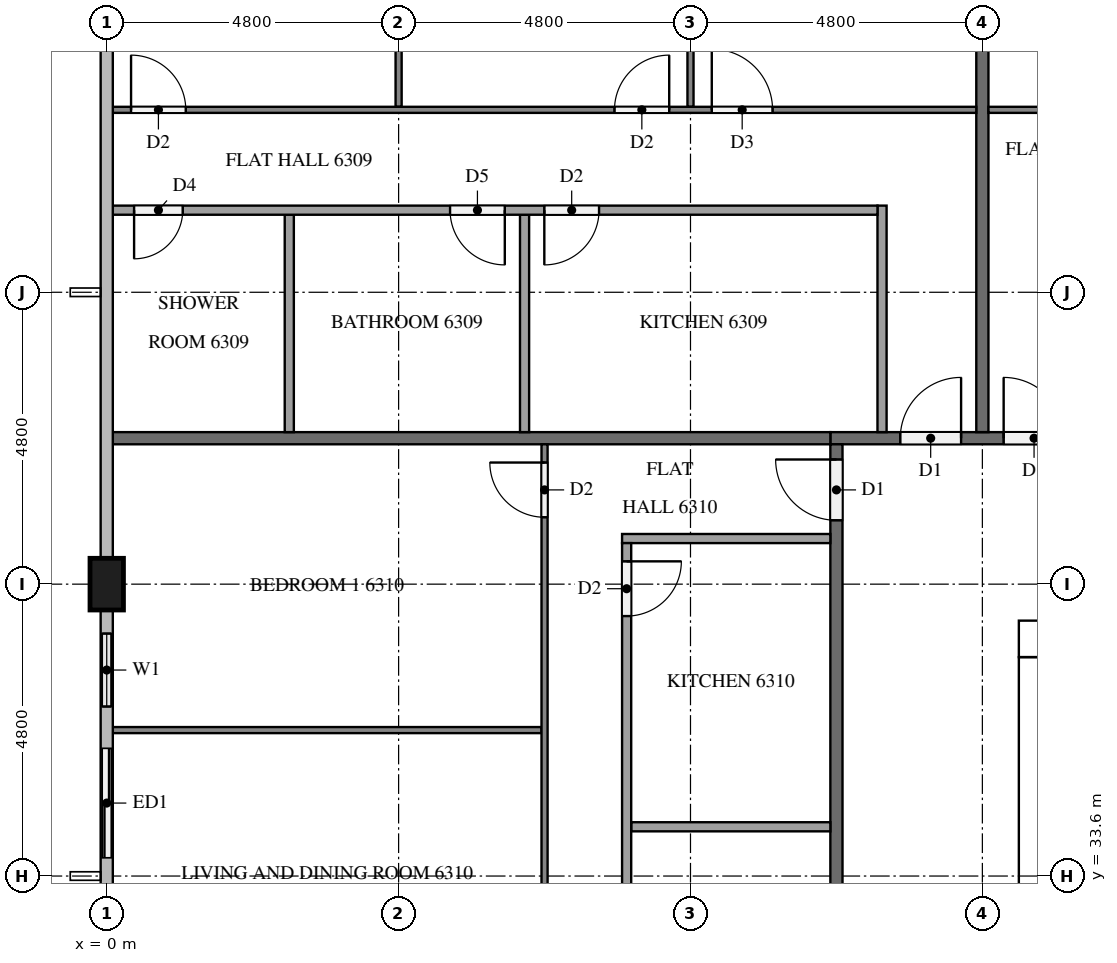
"""IFC4 building model, lengths in metres.
Left out: names, types, materials, properties, quantities, classifications, styles, units other than length and angle.
Written with IfcOpenShell. Run it as: python <this file> out.ifc"""

import sys

from ifc_helpers import new_model, si_unit, direction, frame, frame_2d, origin, origin_2d, place, context, subcontext, project, spatial, rectangle, extrude, element, fill, save


model = new_model("IFC4")
c1 = context("Model", 3, precision=1e-05, world=origin(), true_north=direction((0.0, 1.0)))
c2 = subcontext(c1, "Body", "Model", "MODEL_VIEW")
j1 = project(units=[si_unit("LENGTHUNIT", "METRE"), si_unit("PLANEANGLEUNIT", "RADIAN")], contexts=[c1])
p1 = place(None, origin())
s1 = spatial("IfcSite", under=j1, at=p1, CompositionType="ELEMENT")
p2 = place(p1, origin())
s2 = spatial("IfcBuilding", under=s1, at=p2, CompositionType="ELEMENT")
p3 = place(p2, frame((0.0, 0.0, 242.2)))
s3 = spatial("IfcBuildingStorey", under=s2, at=p3, CompositionType="ELEMENT", Elevation=242.2)
p4 = place(p3, frame((15.0, 37.5, 0.0), z_axis=(0.0, 0.0, 1.0), x_axis=(1.0, 0.0, 0.0)))
e1 = element("IfcWall", 1, at=p4, inside=s3, PredefinedType="SHEAR", context=c2, shape_type="SweptSolid", body=[
    extrude(rectangle(XDim=32.4, YDim=0.6, at=frame_2d((16.2, 0.0))), origin(), (0.0, 0.0, 1.0), 3.2),
])
p5 = place(p4, frame((15.3, 0.0, 0.0)))
e2 = element("IfcOpeningElement", 2, at=p5, cuts=e1, PredefinedType="OPENING", context=c2, shape_type="SweptSolid", body=[
    extrude(rectangle(XDim=1.8, YDim=2.1, at=frame_2d((0.9, 1.05))), frame((0.0, 0.31, 0.0), z_axis=(0.0, -1.0, 0.0), x_axis=(1.0, 0.0, 0.0)), (0.0, 0.0, 1.0), 0.62),
])
p6 = place(p4, frame((1.25, 0.0, 0.0)))
e3 = element("IfcOpeningElement", 3, at=p6, cuts=e1, PredefinedType="OPENING", context=c2, shape_type="SweptSolid", body=[
    extrude(rectangle(XDim=1.0, YDim=2.1, at=frame_2d((0.5, 1.05))), frame((0.0, 0.31, 0.0), z_axis=(0.0, -1.0, 0.0), x_axis=(1.0, 0.0, 0.0)), (0.0, 0.0, 1.0), 0.62),
])
p7 = place(p4, frame((4.988, 0.0, 0.0)))
e4 = element("IfcOpeningElement", 4, at=p7, cuts=e1, PredefinedType="OPENING", context=c2, shape_type="SweptSolid", body=[
    extrude(rectangle(XDim=1.0, YDim=2.1, at=frame_2d((0.5, 1.05))), frame((0.0, 0.31, 0.0), z_axis=(0.0, -1.0, 0.0), x_axis=(1.0, 0.0, 0.0)), (0.0, 0.0, 1.0), 0.62),
])
p8 = place(p3, frame((15.3, 15.6, 0.0), z_axis=(0.0, 0.0, 1.0), x_axis=(0.0, 1.0, 0.0)))
e5 = element("IfcWall", 5, at=p8, inside=s3, PredefinedType="SHEAR", context=c2, shape_type="SweptSolid", body=[
    extrude(rectangle(XDim=21.6, YDim=0.6, at=frame_2d((10.8, 0.0))), origin(), (0.0, 0.0, 1.0), 3.2),
])
p9 = place(p8, frame((5.16, 0.0, 0.0)))
e6 = element("IfcOpeningElement", 6, at=p9, cuts=e5, PredefinedType="OPENING", context=c2, shape_type="SweptSolid", body=[
    extrude(rectangle(XDim=1.2, YDim=2.1, at=frame_2d((0.6, 1.05))), frame((0.0, 0.31, 0.0), z_axis=(0.0, -1.0, 0.0), x_axis=(1.0, 0.0, 0.0)), (0.0, 0.0, 1.0), 0.62),
])
p10 = place(p3, frame((0.0, 38.4, 0.0), z_axis=(0.0, 0.0, 1.0), x_axis=(0.0, 1.0, 0.0)))
e7 = element("IfcColumn", 7, at=p10, inside=s3, PredefinedType="COLUMN", context=c2, shape_type="SweptSolid", body=[
    extrude(rectangle(XDim=0.85, YDim=0.55, at=origin_2d()), origin(), (0.0, 0.0, 1.0), 3.2),
])
p11 = place(p3, frame((0.0, 37.975, 0.0), z_axis=(0.0, 0.0, 1.0), x_axis=(0.0, -1.0, 0.0)))
e8 = element("IfcWall", 8, at=p11, inside=s3, PredefinedType="SOLIDWALL", context=c2, shape_type="SweptSolid", body=[
    extrude(rectangle(XDim=4.375, YDim=0.15, at=frame_2d((2.188, 0.0))), origin(), (0.0, 0.0, 1.0), 3.2),
])
p12 = place(p11, frame((0.387, 0.0, 0.9)))
e9 = element("IfcOpeningElement", 9, at=p12, cuts=e8, PredefinedType="OPENING", context=c2, shape_type="SweptSolid", body=[
    extrude(rectangle(XDim=1.2, YDim=1.4, at=frame_2d((0.6, 0.7))), frame((0.0, 0.085, 0.0), z_axis=(0.0, -1.0, 0.0), x_axis=(1.0, 0.0, 0.0)), (0.0, 0.0, 1.0), 0.17),
])
p13 = place(p11, frame((2.275, 0.0, 0.0)))
e10 = element("IfcOpeningElement", 10, at=p13, cuts=e8, PredefinedType="OPENING", context=c2, shape_type="SweptSolid", body=[
    extrude(rectangle(XDim=1.8, YDim=2.4, at=frame_2d((0.9, 1.2))), frame((0.0, 0.085, 0.0), z_axis=(0.0, -1.0, 0.0), x_axis=(1.0, 0.0, 0.0)), (0.0, 0.0, 1.0), 0.17),
])
p14 = place(p3, frame((11.9, 40.8, 0.0), z_axis=(0.0, 0.0, 1.0), x_axis=(1.0, 0.0, 0.0)))
e11 = element("IfcWall", 11, at=p14, inside=s3, PredefinedType="PARTITIONING", context=c2, shape_type="SweptSolid", body=[
    extrude(rectangle(XDim=38.6, YDim=0.2, at=frame_2d((19.3, 0.0))), origin(), (0.0, 0.0, 1.0), 3.2),
])
p15 = place(p14, frame((34.05, 0.0, 0.0)))
e12 = element("IfcOpeningElement", 12, at=p15, cuts=e11, PredefinedType="OPENING", context=c2, shape_type="SweptSolid", body=[
    extrude(rectangle(XDim=1.0, YDim=2.1, at=frame_2d((0.5, 1.05))), frame((0.0, 0.11, 0.0), z_axis=(0.0, -1.0, 0.0), x_axis=(1.0, 0.0, 0.0)), (0.0, 0.0, 1.0), 0.22),
])
p16 = place(p14, frame((32.3, 0.0, 0.0)))
e13 = element("IfcOpeningElement", 13, at=p16, cuts=e11, PredefinedType="OPENING", context=c2, shape_type="SweptSolid", body=[
    extrude(rectangle(XDim=1.1, YDim=2.1, at=frame_2d((0.55, 1.05))), frame((0.0, 0.11, 0.0), z_axis=(0.0, -1.0, 0.0), x_axis=(1.0, 0.0, 0.0)), (0.0, 0.0, 1.0), 0.22),
])
p17 = place(p14, frame((2.85, 0.0, 0.0)))
e14 = element("IfcOpeningElement", 14, at=p17, cuts=e11, PredefinedType="OPENING", context=c2, shape_type="SweptSolid", body=[
    extrude(rectangle(XDim=1.0, YDim=2.1, at=frame_2d((0.5, 1.05))), frame((0.0, 0.11, 0.0), z_axis=(0.0, -1.0, 0.0), x_axis=(1.0, 0.0, 0.0)), (0.0, 0.0, 1.0), 0.22),
])
p18 = place(p14, frame((1.15, 0.0, 0.0)))
e15 = element("IfcOpeningElement", 15, at=p18, cuts=e11, PredefinedType="OPENING", context=c2, shape_type="SweptSolid", body=[
    extrude(rectangle(XDim=1.0, YDim=2.1, at=frame_2d((0.5, 1.05))), frame((0.0, 0.11, 0.0), z_axis=(0.0, -1.0, 0.0), x_axis=(1.0, 0.0, 0.0)), (0.0, 0.0, 1.0), 0.22),
])
p19 = place(p3, frame((12.0, 12.1, 0.0), z_axis=(0.0, 0.0, 1.0), x_axis=(0.0, 1.0, 0.0)))
e16 = element("IfcWall", 16, at=p19, inside=s3, PredefinedType="PARTITIONING", context=c2, shape_type="SweptSolid", body=[
    extrude(rectangle(XDim=28.6, YDim=0.2, at=frame_2d((14.3, 0.0))), origin(), (0.0, 0.0, 1.0), 3.2),
])
p20 = place(p19, frame((27.35, 0.0, 0.0)))
e17 = element("IfcOpeningElement", 17, at=p20, cuts=e16, PredefinedType="OPENING", context=c2, shape_type="SweptSolid", body=[
    extrude(rectangle(XDim=1.0, YDim=2.1, at=frame_2d((0.5, 1.05))), frame((0.0, 0.11, 0.0), z_axis=(0.0, -1.0, 0.0), x_axis=(1.0, 0.0, 0.0)), (0.0, 0.0, 1.0), 0.22),
])
p21 = place(p19, frame((17.75, 0.0, 0.0)))
e18 = element("IfcOpeningElement", 18, at=p21, cuts=e16, PredefinedType="OPENING", context=c2, shape_type="SweptSolid", body=[
    extrude(rectangle(XDim=1.0, YDim=2.1, at=frame_2d((0.5, 1.05))), frame((0.0, 0.11, 0.0), z_axis=(0.0, -1.0, 0.0), x_axis=(1.0, 0.0, 0.0)), (0.0, 0.0, 1.0), 0.22),
])
p22 = place(p19, frame((3.35, 0.0, 0.0)))
e19 = element("IfcOpeningElement", 19, at=p22, cuts=e16, PredefinedType="OPENING", context=c2, shape_type="SweptSolid", body=[
    extrude(rectangle(XDim=1.0, YDim=2.1, at=frame_2d((0.5, 1.05))), frame((0.0, 0.11, 0.0), z_axis=(0.0, -1.0, 0.0), x_axis=(1.0, 0.0, 0.0)), (0.0, 0.0, 1.0), 0.22),
])
p23 = place(p3, frame((14.4, 52.525, 0.0), z_axis=(0.0, 0.0, 1.0), x_axis=(0.0, -1.0, 0.0)))
e20 = element("IfcWall", 20, at=p23, inside=s3, PredefinedType="PARTITIONING", context=c2, shape_type="SweptSolid", body=[
    extrude(rectangle(XDim=11.625, YDim=0.2, at=frame_2d((5.812, 0.0))), origin(), (0.0, 0.0, 1.0), 3.2),
])
p24 = place(p3, frame((0.1, 40.8, 0.0), z_axis=(0.0, 0.0, 1.0), x_axis=(1.0, 0.0, 0.0)))
e21 = element("IfcWall", 21, at=p24, inside=s3, PredefinedType="PARTITIONING", context=c2, shape_type="SweptSolid", body=[
    extrude(rectangle(XDim=11.8, YDim=0.2, at=frame_2d((5.9, 0.0))), origin(), (0.0, 0.0, 1.0), 3.2),
])
p25 = place(p3, frame((14.5, 46.2, 0.0), z_axis=(0.0, 0.0, 1.0), x_axis=(1.0, 0.0, 0.0)))
e22 = element("IfcWall", 22, at=p25, inside=s3, PredefinedType="PARTITIONING", context=c2, shape_type="SweptSolid", body=[
    extrude(rectangle(XDim=11.8, YDim=0.1, at=frame_2d((5.9, 0.0))), origin(), (0.0, 0.0, 1.0), 3.2),
])
p26 = place(p25, frame((3.45, 0.0, 0.0)))
e23 = element("IfcOpeningElement", 23, at=p26, cuts=e22, PredefinedType="OPENING", context=c2, shape_type="SweptSolid", body=[
    extrude(rectangle(XDim=0.9, YDim=2.1, at=frame_2d((0.45, 1.05))), frame((0.0, 0.06, 0.0), z_axis=(0.0, -1.0, 0.0), x_axis=(1.0, 0.0, 0.0)), (0.0, 0.0, 1.0), 0.12),
])
p27 = place(p25, frame((5.05, 0.0, 0.0)))
e24 = element("IfcOpeningElement", 24, at=p27, cuts=e22, PredefinedType="OPENING", context=c2, shape_type="SweptSolid", body=[
    extrude(rectangle(XDim=1.0, YDim=2.1, at=frame_2d((0.5, 1.05))), frame((0.0, 0.06, 0.0), z_axis=(0.0, -1.0, 0.0), x_axis=(1.0, 0.0, 0.0)), (0.0, 0.0, 1.0), 0.12),
])
p28 = place(p3, frame((9.6, 46.25, 0.0), z_axis=(0.0, 0.0, 1.0), x_axis=(0.0, 1.0, 0.0)))
e25 = element("IfcWall", 25, at=p28, inside=s3, PredefinedType="PARTITIONING", context=c2, shape_type="SweptSolid", body=[
    extrude(rectangle(XDim=6.45, YDim=0.1, at=frame_2d((3.225, 0.0))), origin(), (0.0, 0.0, 1.0), 3.2),
])
p29 = place(p3, frame((4.8, 46.25, 0.0), z_axis=(0.0, 0.0, 1.0), x_axis=(0.0, 1.0, 0.0)))
e26 = element("IfcWall", 26, at=p29, inside=s3, PredefinedType="PARTITIONING", context=c2, shape_type="SweptSolid", body=[
    extrude(rectangle(XDim=6.2, YDim=0.1, at=frame_2d((3.1, 0.0))), origin(), (0.0, 0.0, 1.0), 3.2),
])
p30 = place(p3, frame((0.1, 46.2, 0.0), z_axis=(0.0, 0.0, 1.0), x_axis=(1.0, 0.0, 0.0)))
e27 = element("IfcWall", 27, at=p30, inside=s3, PredefinedType="PARTITIONING", context=c2, shape_type="SweptSolid", body=[
    extrude(rectangle(XDim=14.2, YDim=0.1, at=frame_2d((7.1, 0.0))), origin(), (0.0, 0.0, 1.0), 3.2),
])
p31 = place(p30, frame((9.85, 0.0, 0.0)))
e28 = element("IfcOpeningElement", 28, at=p31, cuts=e27, PredefinedType="OPENING", context=c2, shape_type="SweptSolid", body=[
    extrude(rectangle(XDim=1.0, YDim=2.1, at=frame_2d((0.5, 1.05))), frame((0.0, 0.06, 0.0), z_axis=(0.0, -1.0, 0.0), x_axis=(1.0, 0.0, 0.0)), (0.0, 0.0, 1.0), 0.12),
])
p32 = place(p30, frame((8.25, 0.0, 0.0)))
e29 = element("IfcOpeningElement", 29, at=p32, cuts=e27, PredefinedType="OPENING", context=c2, shape_type="SweptSolid", body=[
    extrude(rectangle(XDim=0.9, YDim=2.1, at=frame_2d((0.45, 1.05))), frame((0.0, 0.06, 0.0), z_axis=(0.0, -1.0, 0.0), x_axis=(1.0, 0.0, 0.0)), (0.0, 0.0, 1.0), 0.12),
])
p33 = place(p30, frame((0.3, 0.0, 0.0)))
e30 = element("IfcOpeningElement", 30, at=p33, cuts=e27, PredefinedType="OPENING", context=c2, shape_type="SweptSolid", body=[
    extrude(rectangle(XDim=0.9, YDim=2.1, at=frame_2d((0.45, 1.05))), frame((0.0, 0.06, 0.0), z_axis=(0.0, -1.0, 0.0), x_axis=(1.0, 0.0, 0.0)), (0.0, 0.0, 1.0), 0.12),
])
for number, where, z_axis, x_axis in (
    (31, (6.871, 40.9, 0.0), (0.0, 0.0, 1.0), (0.0, 1.0, 0.0)),
    (32, (3.002, 40.9, 0.0), (0.0, 0.0, 1.0), (0.0, 1.0, 0.0)),
):
    element("IfcWall", number, at=place(p3, frame(where, z_axis=z_axis, x_axis=x_axis)), inside=s3, PredefinedType="PARTITIONING", context=c2, shape_type="SweptSolid", body=[
        extrude(rectangle(XDim=3.575, YDim=0.15, at=frame_2d((1.788, 0.0))), origin(), (0.0, 0.0, 1.0), 3.2),
    ])
p34 = place(p3, frame((12.75, 40.9, 0.0), z_axis=(0.0, 0.0, 1.0), x_axis=(0.0, 1.0, 0.0)))
e33 = element("IfcWall", 33, at=p34, inside=s3, PredefinedType="PARTITIONING", context=c2, shape_type="SweptSolid", body=[
    extrude(rectangle(XDim=3.725, YDim=0.15, at=frame_2d((1.863, 0.0))), origin(), (0.0, 0.0, 1.0), 3.2),
])
p35 = place(p3, frame((12.675, 44.55, 0.0), z_axis=(0.0, 0.0, 1.0), x_axis=(-1.0, 0.0, 0.0)))
e34 = element("IfcWall", 34, at=p35, inside=s3, PredefinedType="PARTITIONING", context=c2, shape_type="SweptSolid", body=[
    extrude(rectangle(XDim=12.575, YDim=0.15, at=frame_2d((6.288, 0.0))), origin(), (0.0, 0.0, 1.0), 3.2),
])
p36 = place(p35, frame((4.579, 0.0, 0.0)))
e35 = element("IfcOpeningElement", 35, at=p36, cuts=e34, PredefinedType="OPENING", context=c2, shape_type="SweptSolid", body=[
    extrude(rectangle(XDim=0.9, YDim=2.1, at=frame_2d((0.45, 1.05))), frame((0.0, 0.085, 0.0), z_axis=(0.0, -1.0, 0.0), x_axis=(1.0, 0.0, 0.0)), (0.0, 0.0, 1.0), 0.17),
])
p37 = place(p35, frame((6.129, 0.0, 0.0)))
e36 = element("IfcOpeningElement", 36, at=p37, cuts=e34, PredefinedType="OPENING", context=c2, shape_type="SweptSolid", body=[
    extrude(rectangle(XDim=0.9, YDim=2.1, at=frame_2d((0.45, 1.05))), frame((0.0, 0.085, 0.0), z_axis=(0.0, -1.0, 0.0), x_axis=(1.0, 0.0, 0.0)), (0.0, 0.0, 1.0), 0.17),
])
p38 = place(p35, frame((11.425, 0.0, 0.0)))
e37 = element("IfcOpeningElement", 37, at=p38, cuts=e34, PredefinedType="OPENING", context=c2, shape_type="SweptSolid", body=[
    extrude(rectangle(XDim=0.8, YDim=2.1, at=frame_2d((0.4, 1.05))), frame((0.0, 0.085, 0.0), z_axis=(0.0, -1.0, 0.0), x_axis=(1.0, 0.0, 0.0)), (0.0, 0.0, 1.0), 0.17),
])
p39 = place(p3, frame((7.15, 36.0, 0.0), z_axis=(0.0, 0.0, 1.0), x_axis=(-1.0, 0.0, 0.0)))
e38 = element("IfcWall", 38, at=p39, inside=s3, PredefinedType="PARTITIONING", context=c2, shape_type="SweptSolid", body=[
    extrude(rectangle(XDim=7.05, YDim=0.1, at=frame_2d((3.525, 0.0))), origin(), (0.0, 0.0, 1.0), 3.2),
])
p40 = place(p3, frame((7.2, 31.3, 0.0), z_axis=(0.0, 0.0, 1.0), x_axis=(0.0, 1.0, 0.0)))
e39 = element("IfcWall", 39, at=p40, inside=s3, PredefinedType="PARTITIONING", context=c2, shape_type="SweptSolid", body=[
    extrude(rectangle(XDim=9.4, YDim=0.1, at=frame_2d((4.7, 0.0))), origin(), (0.0, 0.0, 1.0), 3.2),
])
p41 = place(p40, frame((8.2, 0.0, 0.0)))
e40 = element("IfcOpeningElement", 40, at=p41, cuts=e39, PredefinedType="OPENING", context=c2, shape_type="SweptSolid", body=[
    extrude(rectangle(XDim=0.9, YDim=2.1, at=frame_2d((0.45, 1.05))), frame((0.0, 0.06, 0.0), z_axis=(0.0, -1.0, 0.0), x_axis=(1.0, 0.0, 0.0)), (0.0, 0.0, 1.0), 0.12),
])
p42 = place(p40, frame((0.3, 0.0, 0.0)))
e41 = element("IfcOpeningElement", 41, at=p42, cuts=e39, PredefinedType="OPENING", context=c2, shape_type="SweptSolid", body=[
    extrude(rectangle(XDim=1.0, YDim=2.1, at=frame_2d((0.5, 1.05))), frame((0.0, 0.06, 0.0), z_axis=(0.0, -1.0, 0.0), x_axis=(1.0, 0.0, 0.0)), (0.0, 0.0, 1.0), 0.12),
])
p43 = place(p3, frame((11.9, 34.41, 0.0), z_axis=(0.0, 0.0, 1.0), x_axis=(-1.0, 0.0, 0.0)))
e42 = element("IfcWall", 42, at=p43, inside=s3, PredefinedType="PARTITIONING", context=c2, shape_type="SweptSolid", body=[
    extrude(rectangle(XDim=3.275, YDim=0.15, at=frame_2d((1.637, 0.0))), origin(), (0.0, 0.0, 1.0), 3.2),
])
p44 = place(p3, frame((11.9, 39.15, 0.0), z_axis=(0.0, 0.0, 1.0), x_axis=(-1.0, 0.0, 0.0)))
e43 = element("IfcWall", 43, at=p44, inside=s3, PredefinedType="PARTITIONING", context=c2, shape_type="SweptSolid", body=[
    extrude(rectangle(XDim=3.425, YDim=0.15, at=frame_2d((1.712, 0.0))), origin(), (0.0, 0.0, 1.0), 3.2),
])
p45 = place(p3, frame((8.55, 39.075, 0.0), z_axis=(0.0, 0.0, 1.0), x_axis=(0.0, -1.0, 0.0)))
e44 = element("IfcWall", 44, at=p45, inside=s3, PredefinedType="PARTITIONING", context=c2, shape_type="SweptSolid", body=[
    extrude(rectangle(XDim=7.775, YDim=0.15, at=frame_2d((3.887, 0.0))), origin(), (0.0, 0.0, 1.0), 3.2),
])
p46 = place(p45, frame((0.3, 0.0, 0.0)))
e45 = element("IfcOpeningElement", 45, at=p46, cuts=e44, PredefinedType="OPENING", context=c2, shape_type="SweptSolid", body=[
    extrude(rectangle(XDim=0.9, YDim=2.1, at=frame_2d((0.45, 1.05))), frame((0.0, 0.085, 0.0), z_axis=(0.0, -1.0, 0.0), x_axis=(1.0, 0.0, 0.0)), (0.0, 0.0, 1.0), 0.17),
])
p47 = place(p45, frame((6.625, 0.0, 0.0)))
e46 = element("IfcOpeningElement", 46, at=p47, cuts=e44, PredefinedType="OPENING", context=c2, shape_type="SweptSolid", body=[
    extrude(rectangle(XDim=0.8, YDim=2.1, at=frame_2d((0.4, 1.05))), frame((0.0, 0.085, 0.0), z_axis=(0.0, -1.0, 0.0), x_axis=(1.0, 0.0, 0.0)), (0.0, 0.0, 1.0), 0.17),
])
p48 = place(p12, origin())
e47 = element("IfcWindow", 47, at=p48, inside=s3, PartitioningType="SINGLE_PANEL", PredefinedType="WINDOW", context=c2, shape_type="SweptSolid", body=[
    extrude(rectangle(XDim=1.2, YDim=1.4, at=frame_2d((0.6, 0.7))), frame((0.0, 0.03, 0.0), z_axis=(0.0, -1.0, 0.0), x_axis=(1.0, 0.0, 0.0)), (0.0, 0.0, 1.0), 0.06),
])
fill(e9, e47)
p49 = place(p13, origin())
e48 = element("IfcDoor", 48, at=p49, inside=s3, OperationType="SLIDING_TO_LEFT", PredefinedType="DOOR", context=c2, shape_type="SweptSolid", body=[
    extrude(rectangle(XDim=1.8, YDim=2.4, at=frame_2d((0.9, 1.2))), frame((0.0, 0.025, 0.0), z_axis=(0.0, -1.0, 0.0), x_axis=(1.0, 0.0, 0.0)), (0.0, 0.0, 1.0), 0.05),
])
fill(e10, e48)
p50 = place(p17, origin())
e49 = element("IfcDoor", 49, at=p50, inside=s3, OperationType="SINGLE_SWING_LEFT", PredefinedType="DOOR", context=c2, shape_type="SweptSolid", body=[
    extrude(rectangle(XDim=1.0, YDim=2.1, at=frame_2d((0.5, 1.05))), frame((0.0, 0.025, 0.0), z_axis=(0.0, -1.0, 0.0), x_axis=(1.0, 0.0, 0.0)), (0.0, 0.0, 1.0), 0.05),
])
fill(e14, e49)
p51 = place(p18, origin())
e50 = element("IfcDoor", 50, at=p51, inside=s3, OperationType="SINGLE_SWING_RIGHT", PredefinedType="DOOR", context=c2, shape_type="SweptSolid", body=[
    extrude(rectangle(XDim=1.0, YDim=2.1, at=frame_2d((0.5, 1.05))), frame((0.0, 0.025, 0.0), z_axis=(0.0, -1.0, 0.0), x_axis=(1.0, 0.0, 0.0)), (0.0, 0.0, 1.0), 0.05),
])
fill(e15, e50)
p52 = place(p20, origin())
e51 = element("IfcDoor", 51, at=p52, inside=s3, OperationType="SINGLE_SWING_RIGHT", PredefinedType="DOOR", context=c2, shape_type="SweptSolid", body=[
    extrude(rectangle(XDim=1.0, YDim=2.1, at=frame_2d((0.5, 1.05))), frame((0.0, 0.025, 0.0), z_axis=(0.0, -1.0, 0.0), x_axis=(1.0, 0.0, 0.0)), (0.0, 0.0, 1.0), 0.05),
])
fill(e17, e51)
p53 = place(p31, origin())
e52 = element("IfcDoor", 52, at=p53, inside=s3, OperationType="SINGLE_SWING_LEFT", PredefinedType="DOOR", context=c2, shape_type="SweptSolid", body=[
    extrude(rectangle(XDim=1.0, YDim=2.1, at=frame_2d((0.5, 1.05))), frame((0.0, 0.025, 0.0), z_axis=(0.0, -1.0, 0.0), x_axis=(1.0, 0.0, 0.0)), (0.0, 0.0, 1.0), 0.05),
])
fill(e28, e52)
p54 = place(p32, origin())
e53 = element("IfcDoor", 53, at=p54, inside=s3, OperationType="SINGLE_SWING_RIGHT", PredefinedType="DOOR", context=c2, shape_type="SweptSolid", body=[
    extrude(rectangle(XDim=0.9, YDim=2.1, at=frame_2d((0.45, 1.05))), frame((0.0, 0.025, 0.0), z_axis=(0.0, -1.0, 0.0), x_axis=(1.0, 0.0, 0.0)), (0.0, 0.0, 1.0), 0.05),
])
fill(e29, e53)
p55 = place(p33, origin())
e54 = element("IfcDoor", 54, at=p55, inside=s3, OperationType="SINGLE_SWING_LEFT", PredefinedType="DOOR", context=c2, shape_type="SweptSolid", body=[
    extrude(rectangle(XDim=0.9, YDim=2.1, at=frame_2d((0.45, 1.05))), frame((0.0, 0.025, 0.0), z_axis=(0.0, -1.0, 0.0), x_axis=(1.0, 0.0, 0.0)), (0.0, 0.0, 1.0), 0.05),
])
fill(e30, e54)
p56 = place(p36, origin())
e55 = element("IfcDoor", 55, at=p56, inside=s3, OperationType="SINGLE_SWING_RIGHT", PredefinedType="DOOR", context=c2, shape_type="SweptSolid", body=[
    extrude(rectangle(XDim=0.9, YDim=2.1, at=frame_2d((0.45, 1.05))), frame((0.0, 0.025, 0.0), z_axis=(0.0, -1.0, 0.0), x_axis=(1.0, 0.0, 0.0)), (0.0, 0.0, 1.0), 0.05),
])
fill(e35, e55)
p57 = place(p37, origin())
e56 = element("IfcDoor", 56, at=p57, inside=s3, OperationType="SINGLE_SWING_LEFT", PredefinedType="DOOR", context=c2, shape_type="SweptSolid", body=[
    extrude(rectangle(XDim=0.9, YDim=2.1, at=frame_2d((0.45, 1.05))), frame((0.0, 0.025, 0.0), z_axis=(0.0, -1.0, 0.0), x_axis=(1.0, 0.0, 0.0)), (0.0, 0.0, 1.0), 0.05),
])
fill(e36, e56)
p58 = place(p38, origin())
e57 = element("IfcDoor", 57, at=p58, inside=s3, OperationType="SINGLE_SWING_RIGHT", PredefinedType="DOOR", context=c2, shape_type="SweptSolid", body=[
    extrude(rectangle(XDim=0.8, YDim=2.1, at=frame_2d((0.4, 1.05))), frame((0.0, 0.025, 0.0), z_axis=(0.0, -1.0, 0.0), x_axis=(1.0, 0.0, 0.0)), (0.0, 0.0, 1.0), 0.05),
])
fill(e37, e57)
p59 = place(p41, origin())
e58 = element("IfcDoor", 58, at=p59, inside=s3, OperationType="SINGLE_SWING_RIGHT", PredefinedType="DOOR", context=c2, shape_type="SweptSolid", body=[
    extrude(rectangle(XDim=0.9, YDim=2.1, at=frame_2d((0.45, 1.05))), frame((0.0, 0.025, 0.0), z_axis=(0.0, -1.0, 0.0), x_axis=(1.0, 0.0, 0.0)), (0.0, 0.0, 1.0), 0.05),
])
fill(e40, e58)
p60 = place(p46, origin())
e59 = element("IfcDoor", 59, at=p60, inside=s3, OperationType="SINGLE_SWING_LEFT", PredefinedType="DOOR", context=c2, shape_type="SweptSolid", body=[
    extrude(rectangle(XDim=0.9, YDim=2.1, at=frame_2d((0.45, 1.05))), frame((0.0, 0.025, 0.0), z_axis=(0.0, -1.0, 0.0), x_axis=(1.0, 0.0, 0.0)), (0.0, 0.0, 1.0), 0.05),
])
fill(e45, e59)
save(model, sys.argv[1])
